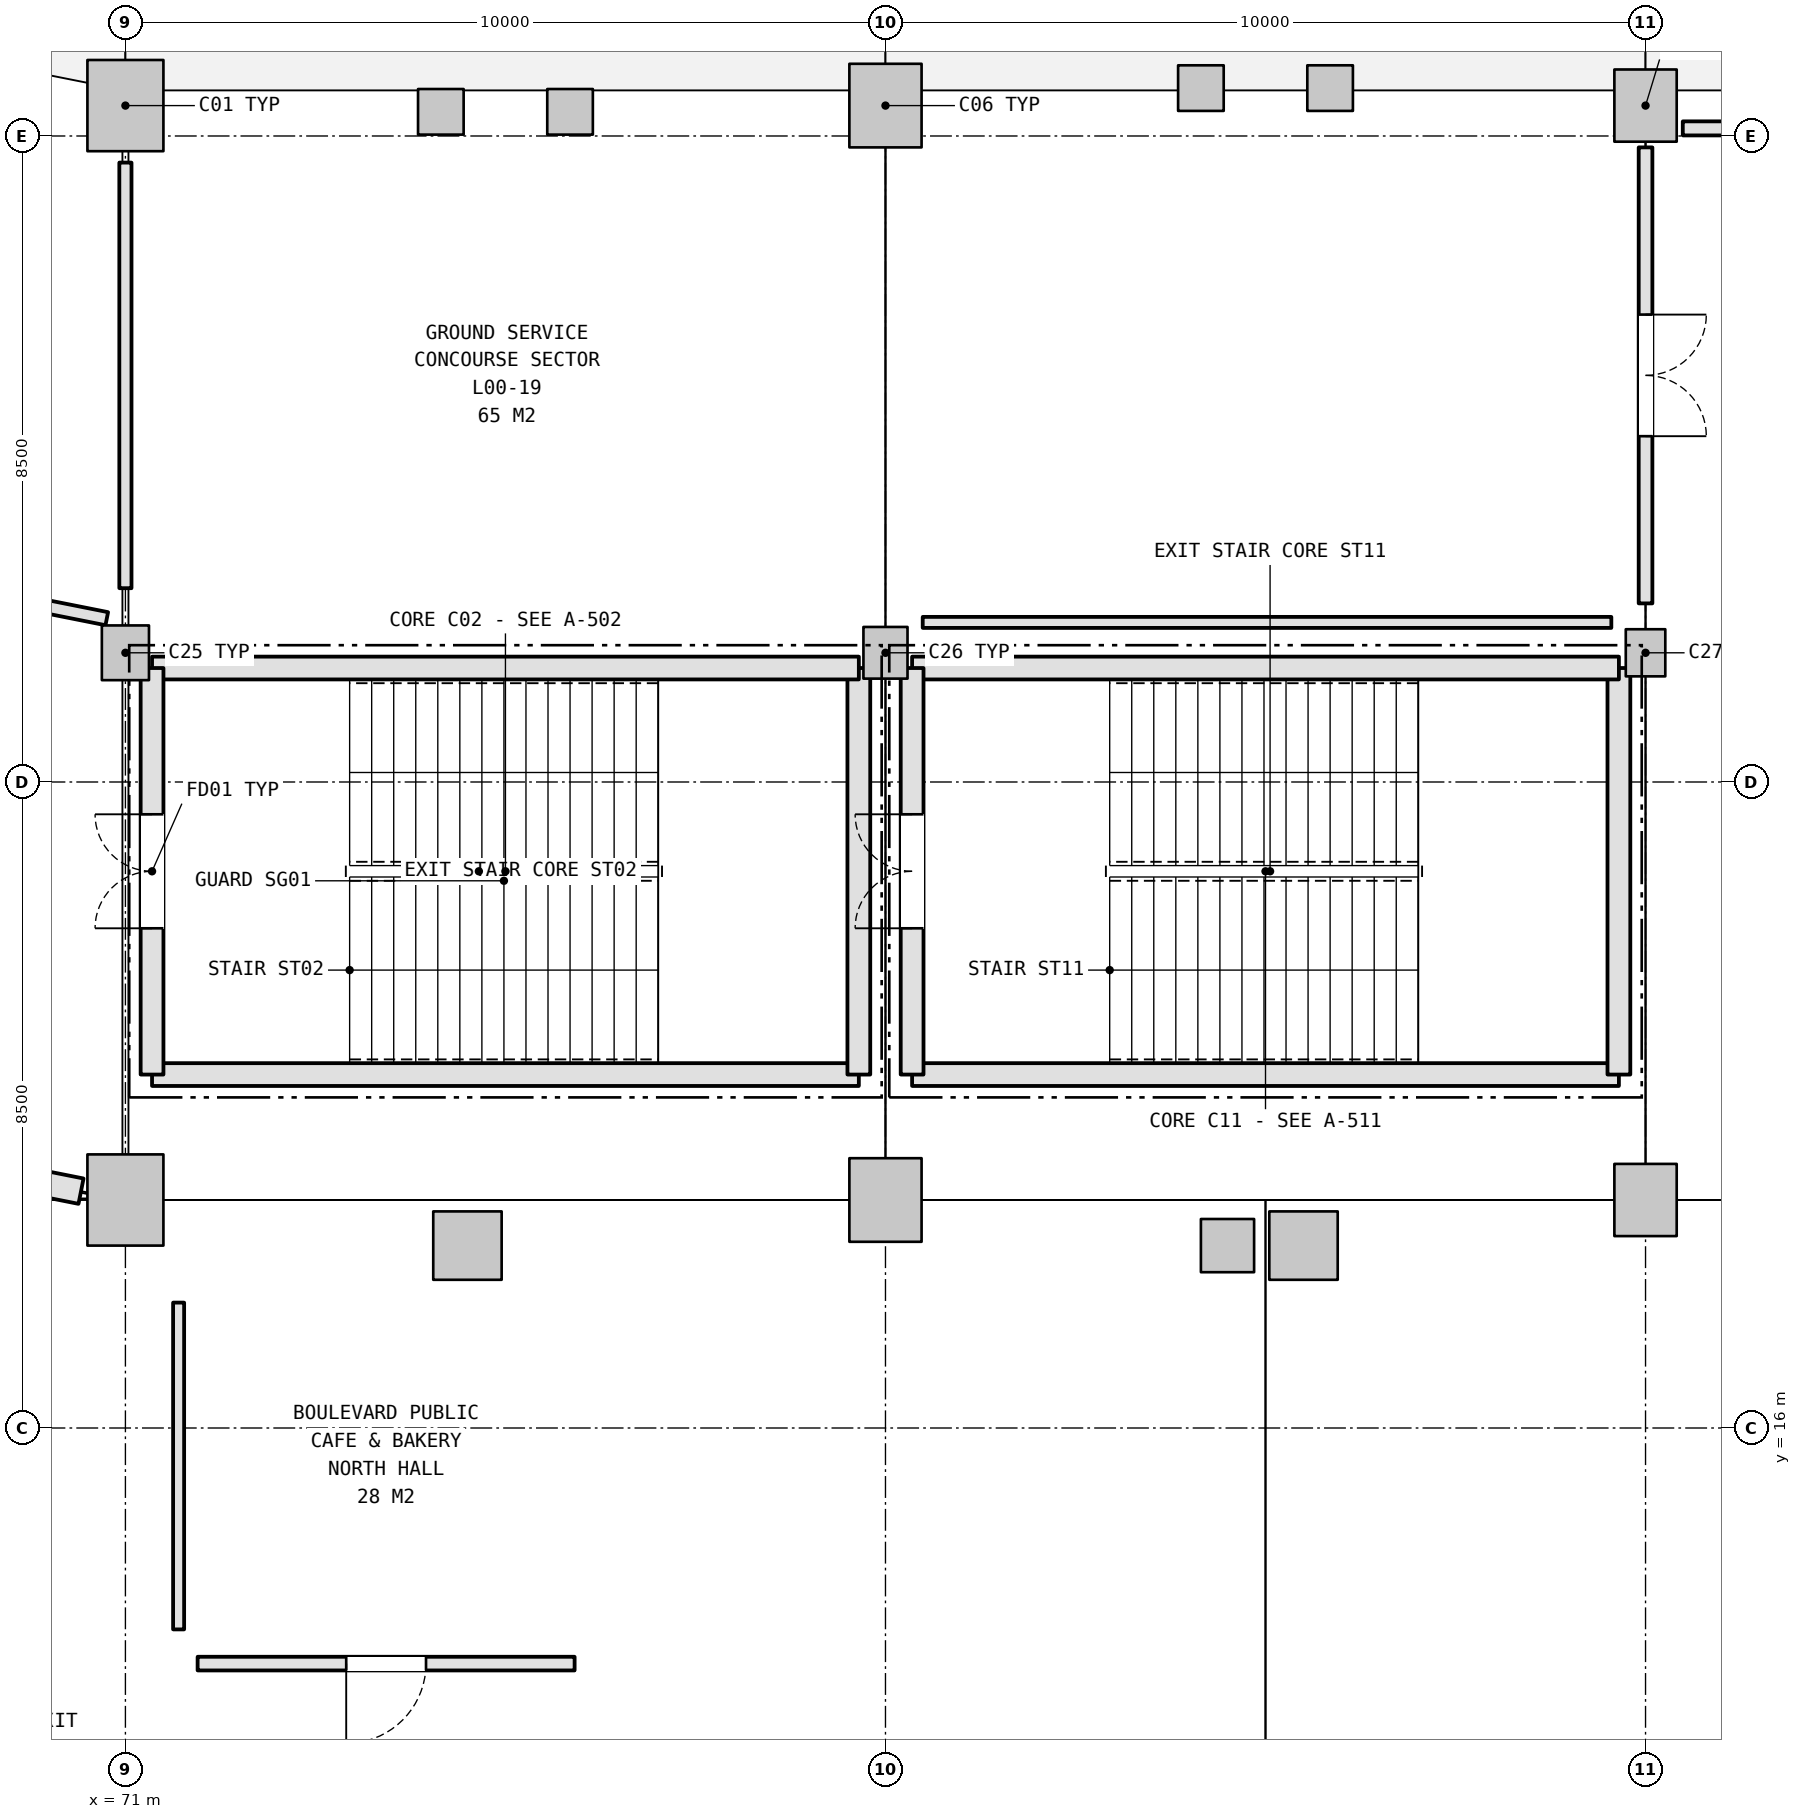
"""IFC4 building model, lengths in metres.
Left out: names, types, materials, properties, quantities, classifications, styles, units other than length and angle.
Written with IfcOpenShell. Run it as: python <this file> out.ifc"""

import sys

from ifc_helpers import new_model, si_unit, direction, frame, frame_2d, origin, origin_2d, place, context, subcontext, project, spatial, rectangle, extrude, element, fill, save


model = new_model("IFC4")
c1 = context("Model", 3, precision=1e-05, world=origin(), true_north=direction((0.0, 1.0)))
c2 = subcontext(c1, "Body", "Model", "MODEL_VIEW")
j1 = project(units=[si_unit("LENGTHUNIT", "METRE"), si_unit("PLANEANGLEUNIT", "RADIAN")], contexts=[c1])
p1 = place(None, origin())
s1 = spatial("IfcSite", under=j1, at=p1, CompositionType="ELEMENT")
p2 = place(p1, origin())
s2 = spatial("IfcBuilding", under=s1, at=p2, CompositionType="ELEMENT")
p3 = place(p2, origin())
s3 = spatial("IfcBuildingStorey", under=s2, at=p3, CompositionType="ELEMENT", Elevation=0.0)
p4 = place(p3, frame((71.0, 33.4, 0.0), z_axis=(0.0, 0.0, 1.0), x_axis=(1.0, 0.0, 0.0)))
e1 = element("IfcColumn", 1, at=p4, inside=s3, PredefinedType="COLUMN", context=c2, shape_type="SweptSolid", body=[
    extrude(rectangle(XDim=1.0, YDim=1.2, at=origin_2d()), origin(), (0.0, 0.0, 1.0), 5.4),
])
p5 = place(p3, frame((71.0, 26.2, 0.0), z_axis=(0.0, 0.0, 1.0), x_axis=(1.0, 0.0, 0.0)))
e2 = element("IfcColumn", 2, at=p5, inside=s3, PredefinedType="COLUMN", context=c2, shape_type="SweptSolid", body=[
    extrude(rectangle(XDim=0.62, YDim=0.72, at=origin_2d()), origin(), (0.0, 0.0, 1.0), 5.4),
])
p6 = place(p3, frame((71.0, 19.0, 0.0), z_axis=(0.0, 0.0, 1.0), x_axis=(1.0, 0.0, 0.0)))
e3 = element("IfcColumn", 3, at=p6, inside=s3, PredefinedType="COLUMN", context=c2, shape_type="SweptSolid", body=[
    extrude(rectangle(XDim=1.0, YDim=1.2, at=origin_2d()), origin(), (0.0, 0.0, 1.0), 5.4),
])
p7 = place(p3, frame((81.0, 33.4, 0.0), z_axis=(0.0, 0.0, 1.0), x_axis=(1.0, 0.0, 0.0)))
e4 = element("IfcColumn", 4, at=p7, inside=s3, PredefinedType="COLUMN", context=c2, shape_type="SweptSolid", body=[
    extrude(rectangle(XDim=0.95, YDim=1.1, at=origin_2d()), origin(), (0.0, 0.0, 1.0), 5.4),
])
p8 = place(p3, frame((81.0, 26.2, 0.0), z_axis=(0.0, 0.0, 1.0), x_axis=(1.0, 0.0, 0.0)))
e5 = element("IfcColumn", 5, at=p8, inside=s3, PredefinedType="COLUMN", context=c2, shape_type="SweptSolid", body=[
    extrude(rectangle(XDim=0.58, YDim=0.68, at=origin_2d()), origin(), (0.0, 0.0, 1.0), 5.4),
])
p9 = place(p3, frame((81.0, 19.0, 0.0), z_axis=(0.0, 0.0, 1.0), x_axis=(1.0, 0.0, 0.0)))
e6 = element("IfcColumn", 6, at=p9, inside=s3, PredefinedType="COLUMN", context=c2, shape_type="SweptSolid", body=[
    extrude(rectangle(XDim=0.95, YDim=1.1, at=origin_2d()), origin(), (0.0, 0.0, 1.0), 5.4),
])
p10 = place(p3, frame((91.0, 33.4, 0.0), z_axis=(0.0, 0.0, 1.0), x_axis=(1.0, 0.0, 0.0)))
e7 = element("IfcColumn", 7, at=p10, inside=s3, PredefinedType="COLUMN", context=c2, shape_type="SweptSolid", body=[
    extrude(rectangle(XDim=0.82, YDim=0.95, at=origin_2d()), origin(), (0.0, 0.0, 1.0), 5.4),
])
p11 = place(p3, frame((91.0, 26.2, 0.0), z_axis=(0.0, 0.0, 1.0), x_axis=(1.0, 0.0, 0.0)))
e8 = element("IfcColumn", 8, at=p11, inside=s3, PredefinedType="COLUMN", context=c2, shape_type="SweptSolid", body=[
    extrude(rectangle(XDim=0.52, YDim=0.62, at=origin_2d()), origin(), (0.0, 0.0, 1.0), 5.4),
])
p12 = place(p3, frame((91.0, 19.0, 0.0), z_axis=(0.0, 0.0, 1.0), x_axis=(1.0, 0.0, 0.0)))
e9 = element("IfcColumn", 9, at=p12, inside=s3, PredefinedType="COLUMN", context=c2, shape_type="SweptSolid", body=[
    extrude(rectangle(XDim=0.82, YDim=0.95, at=origin_2d()), origin(), (0.0, 0.0, 1.0), 5.4),
])
p13 = place(p3, frame((75.5, 18.4, 0.0), z_axis=(0.0, 0.0, 1.0), x_axis=(1.0, 0.0, 0.0)))
e10 = element("IfcColumn", 10, at=p13, inside=s3, PredefinedType="COLUMN", context=c2, shape_type="SweptSolid", body=[
    extrude(rectangle(XDim=0.9, YDim=0.9, at=origin_2d()), origin(), (0.0, 0.0, 1.0), 5.4),
])
p14 = place(p3, frame((85.5, 18.4, 0.0), z_axis=(0.0, 0.0, 1.0), x_axis=(1.0, 0.0, 0.0)))
e11 = element("IfcColumn", 11, at=p14, inside=s3, PredefinedType="COLUMN", context=c2, shape_type="SweptSolid", body=[
    extrude(rectangle(XDim=0.7, YDim=0.7, at=origin_2d()), origin(), (0.0, 0.0, 1.0), 5.4),
])
p15 = place(p3, frame((86.5, 18.4, 0.0), z_axis=(0.0, 0.0, 1.0), x_axis=(1.0, 0.0, 0.0)))
e12 = element("IfcColumn", 12, at=p15, inside=s3, PredefinedType="COLUMN", context=c2, shape_type="SweptSolid", body=[
    extrude(rectangle(XDim=0.9, YDim=0.9, at=origin_2d()), origin(), (0.0, 0.0, 1.0), 5.4),
])
p16 = place(p3, frame((51.489, 22.881, 0.0), z_axis=(0.0, 0.0, 1.0), x_axis=(0.98078547189, -0.195089359346, 0.0)))
e13 = element("IfcWall", 13, at=p16, inside=s3, PredefinedType="SOLIDWALL", context=c2, shape_type="SweptSolid", body=[
    extrude(rectangle(XDim=19.298, YDim=0.34, at=frame_2d((9.649, 0.0))), origin(), (0.0, 0.0, 1.0), 4.275),
])
p17 = place(p16, frame((8.849, 0.0, 2.4)))
e14 = element("IfcOpeningElement", 14, at=p17, cuts=e13, PredefinedType="OPENING", context=c2, shape_type="SweptSolid", body=[
    extrude(rectangle(XDim=1.6, YDim=1.2, at=frame_2d((0.8, 0.6))), frame((0.0, 0.18, 0.0), z_axis=(0.0, -1.0, 0.0), x_axis=(1.0, 0.0, 0.0)), (0.0, 0.0, 1.0), 0.36),
])
p18 = place(p3, frame((71.35, 20.65, 0.0), z_axis=(0.0, 0.0, 1.0), x_axis=(1.0, 0.0, 0.0)))
e15 = element("IfcWall", 15, at=p18, inside=s3, PredefinedType="SHEAR", context=c2, shape_type="SweptSolid", body=[
    extrude(rectangle(XDim=9.299, YDim=0.3, at=frame_2d((4.65, 0.0))), origin(), (0.0, 0.0, 1.0), 5.14),
])
p19 = place(p3, frame((80.65, 20.65, 0.0), z_axis=(0.0, 0.0, 1.0), x_axis=(0.0, 1.0, 0.0)))
e16 = element("IfcWall", 16, at=p19, inside=s3, PredefinedType="SHEAR", context=c2, shape_type="SweptSolid", body=[
    extrude(rectangle(XDim=5.349, YDim=0.3, at=frame_2d((2.675, 0.0))), origin(), (0.0, 0.0, 1.0), 5.14),
])
p20 = place(p3, frame((80.65, 26.0, 0.0), z_axis=(0.0, 0.0, 1.0), x_axis=(-1.0, 0.0, 0.0)))
e17 = element("IfcWall", 17, at=p20, inside=s3, PredefinedType="SHEAR", context=c2, shape_type="SweptSolid", body=[
    extrude(rectangle(XDim=9.299, YDim=0.3, at=frame_2d((4.65, 0.0))), origin(), (0.0, 0.0, 1.0), 5.14),
])
p21 = place(p3, frame((71.35, 26.0, 0.0), z_axis=(0.0, 0.0, 1.0), x_axis=(0.0, -1.0, 0.0)))
e18 = element("IfcWall", 18, at=p21, inside=s3, PredefinedType="SHEAR", context=c2, shape_type="SweptSolid", body=[
    extrude(rectangle(XDim=5.349, YDim=0.3, at=frame_2d((2.675, 0.0))), origin(), (0.0, 0.0, 1.0), 5.14),
])
p22 = place(p21, frame((1.925, 0.0, 0.0)))
e19 = element("IfcOpeningElement", 19, at=p22, cuts=e18, PredefinedType="OPENING", context=c2, shape_type="SweptSolid", body=[
    extrude(rectangle(XDim=1.5, YDim=2.2, at=frame_2d((0.75, 1.1))), frame((0.0, 0.16, 0.0), z_axis=(0.0, -1.0, 0.0), x_axis=(1.0, 0.0, 0.0)), (0.0, 0.0, 1.0), 0.32),
])
p23 = place(p3, frame((81.35, 20.65, 0.0), z_axis=(0.0, 0.0, 1.0), x_axis=(1.0, 0.0, 0.0)))
e20 = element("IfcWall", 20, at=p23, inside=s3, PredefinedType="SHEAR", context=c2, shape_type="SweptSolid", body=[
    extrude(rectangle(XDim=9.299, YDim=0.3, at=frame_2d((4.65, 0.0))), origin(), (0.0, 0.0, 1.0), 5.14),
])
p24 = place(p3, frame((90.65, 20.65, 0.0), z_axis=(0.0, 0.0, 1.0), x_axis=(0.0, 1.0, 0.0)))
e21 = element("IfcWall", 21, at=p24, inside=s3, PredefinedType="SHEAR", context=c2, shape_type="SweptSolid", body=[
    extrude(rectangle(XDim=5.349, YDim=0.3, at=frame_2d((2.675, 0.0))), origin(), (0.0, 0.0, 1.0), 5.14),
])
p25 = place(p3, frame((90.65, 26.0, 0.0), z_axis=(0.0, 0.0, 1.0), x_axis=(-1.0, 0.0, 0.0)))
e22 = element("IfcWall", 22, at=p25, inside=s3, PredefinedType="SHEAR", context=c2, shape_type="SweptSolid", body=[
    extrude(rectangle(XDim=9.299, YDim=0.3, at=frame_2d((4.65, 0.0))), origin(), (0.0, 0.0, 1.0), 5.14),
])
p26 = place(p3, frame((81.35, 26.0, 0.0), z_axis=(0.0, 0.0, 1.0), x_axis=(0.0, -1.0, 0.0)))
e23 = element("IfcWall", 23, at=p26, inside=s3, PredefinedType="SHEAR", context=c2, shape_type="SweptSolid", body=[
    extrude(rectangle(XDim=5.349, YDim=0.3, at=frame_2d((2.675, 0.0))), origin(), (0.0, 0.0, 1.0), 5.14),
])
p27 = place(p26, frame((1.925, 0.0, 0.0)))
e24 = element("IfcOpeningElement", 24, at=p27, cuts=e23, PredefinedType="OPENING", context=c2, shape_type="SweptSolid", body=[
    extrude(rectangle(XDim=1.5, YDim=2.2, at=frame_2d((0.75, 1.1))), frame((0.0, 0.16, 0.0), z_axis=(0.0, -1.0, 0.0), x_axis=(1.0, 0.0, 0.0)), (0.0, 0.0, 1.0), 0.32),
])
for number, where, z_axis, x_axis in (
    (25, (86.85, 33.63, 0.0), (0.0, 0.0, 1.0), (1.0, 0.0, 0.0)),
    (26, (85.15, 33.63, 0.0), (0.0, 0.0, 1.0), (1.0, 0.0, 0.0)),
    (27, (76.85, 33.318, 0.0), (0.0, 0.0, 1.0), (1.0, 0.0, 0.0)),
    (28, (75.15, 33.318, 0.0), (0.0, 0.0, 1.0), (1.0, 0.0, 0.0)),
):
    element("IfcColumn", number, at=place(p3, frame(where, z_axis=z_axis, x_axis=x_axis)), inside=s3, PredefinedType="COLUMN", context=c2, shape_type="SweptSolid", body=[
        extrude(rectangle(XDim=0.6, YDim=0.6, at=origin_2d()), origin(), (0.0, 0.0, 1.0), 5.4),
    ])
p28 = place(p3, frame((76.91, 12.9, 0.0), z_axis=(0.0, 0.0, 1.0), x_axis=(-1.0, 0.0, 0.0)))
e29 = element("IfcWall", 29, at=p28, inside=s3, PredefinedType="PARTITIONING", context=c2, shape_type="SweptSolid", body=[
    extrude(rectangle(XDim=4.96, YDim=0.18, at=frame_2d((2.48, 0.0))), origin(), (0.0, 0.0, 1.0), 4.425),
])
p29 = place(p28, frame((1.955, 0.0, 0.0)))
e30 = element("IfcOpeningElement", 30, at=p29, cuts=e29, PredefinedType="OPENING", context=c2, shape_type="SweptSolid", body=[
    extrude(rectangle(XDim=1.05, YDim=2.2, at=frame_2d((0.525, 1.1))), frame((0.0, 0.1, 0.0), z_axis=(0.0, -1.0, 0.0), x_axis=(1.0, 0.0, 0.0)), (0.0, 0.0, 1.0), 0.2),
])
p30 = place(p3, frame((71.7, 13.35, 0.0), z_axis=(0.0, 0.0, 1.0), x_axis=(0.0, 1.0, 0.0)))
e31 = element("IfcWall", 31, at=p30, inside=s3, PredefinedType="PARTITIONING", context=c2, shape_type="SweptSolid", body=[
    extrude(rectangle(XDim=4.3, YDim=0.145, at=frame_2d((2.15, 0.0))), origin(), (0.0, 0.0, 1.0), 4.625),
])
p31 = place(p3, frame((70.755, 26.649, 0.0), z_axis=(0.0, 0.0, 1.0), x_axis=(-0.980783244425, 0.195100557291, 0.0)))
e32 = element("IfcWall", 32, at=p31, inside=s3, PredefinedType="PARTITIONING", context=c2, shape_type="SweptSolid", body=[
    extrude(rectangle(XDim=16.783, YDim=0.175, at=frame_2d((8.392, 0.0))), origin(), (0.0, 0.0, 1.0), 4.375),
])
p32 = place(p31, frame((7.932, 0.0, 0.0)))
e33 = element("IfcOpeningElement", 33, at=p32, cuts=e32, PredefinedType="OPENING", context=c2, shape_type="SweptSolid", body=[
    extrude(rectangle(XDim=0.92, YDim=2.1, at=frame_2d((0.46, 1.05))), frame((0.0, 0.097, 0.0), z_axis=(0.0, -1.0, 0.0), x_axis=(1.0, 0.0, 0.0)), (0.0, 0.0, 1.0), 0.195),
])
p33 = place(p3, frame((71.0, 32.65, 0.0), z_axis=(0.0, 0.0, 1.0), x_axis=(0.0, -1.0, 0.0)))
e34 = element("IfcWall", 34, at=p33, inside=s3, PredefinedType="PARTITIONING", context=c2, shape_type="SweptSolid", body=[
    extrude(rectangle(XDim=5.6, YDim=0.16, at=frame_2d((2.8, 0.0))), origin(), (0.0, 0.0, 1.0), 4.365),
])
p34 = place(p3, frame((91.0, 32.85, 0.0), z_axis=(0.0, 0.0, 1.0), x_axis=(0.0, -1.0, 0.0)))
e35 = element("IfcWall", 35, at=p34, inside=s3, PredefinedType="PARTITIONING", context=c2, shape_type="SweptSolid", body=[
    extrude(rectangle(XDim=6.0, YDim=0.18, at=frame_2d((3.0, 0.0))), origin(), (0.0, 0.0, 1.0), 4.305),
])
p35 = place(p34, frame((2.2, 0.0, 0.0)))
e36 = element("IfcOpeningElement", 36, at=p35, cuts=e35, PredefinedType="OPENING", context=c2, shape_type="SweptSolid", body=[
    extrude(rectangle(XDim=1.6, YDim=2.2, at=frame_2d((0.8, 1.1))), frame((0.0, 0.1, 0.0), z_axis=(0.0, -1.0, 0.0), x_axis=(1.0, 0.0, 0.0)), (0.0, 0.0, 1.0), 0.2),
])
p36 = place(p3, frame((90.55, 26.6, 0.0), z_axis=(0.0, 0.0, 1.0), x_axis=(-1.0, 0.0, 0.0)))
e37 = element("IfcWall", 37, at=p36, inside=s3, PredefinedType="PARTITIONING", context=c2, shape_type="SweptSolid", body=[
    extrude(rectangle(XDim=9.06, YDim=0.145, at=frame_2d((4.53, 0.0))), origin(), (0.0, 0.0, 1.0), 5.12),
])
p37 = place(p3, frame((91.49, 33.1, 0.0), z_axis=(0.0, 0.0, 1.0), x_axis=(1.0, 0.0, 0.0)))
e38 = element("IfcWall", 38, at=p37, inside=s3, PredefinedType="PARTITIONING", context=c2, shape_type="SweptSolid", body=[
    extrude(rectangle(XDim=9.06, YDim=0.185, at=frame_2d((4.53, 0.0))), origin(), (0.0, 0.0, 1.0), 4.325),
])
p38 = place(p22, frame((1.5, 0.0, 0.0), z_axis=(0.0, 0.0, 1.0), x_axis=(-1.0, 0.0, 0.0)))
e39 = element("IfcDoor", 39, at=p38, inside=s3, OperationType="DOUBLE_DOOR_SINGLE_SWING", PredefinedType="DOOR", context=c2, shape_type="SweptSolid", body=[
    extrude(rectangle(XDim=1.5, YDim=2.2, at=frame_2d((0.75, 1.1))), frame((0.0, 0.025, 0.0), z_axis=(0.0, -1.0, 0.0), x_axis=(1.0, 0.0, 0.0)), (0.0, 0.0, 1.0), 0.05),
])
fill(e19, e39)
p39 = place(p27, frame((1.5, 0.0, 0.0), z_axis=(0.0, 0.0, 1.0), x_axis=(-1.0, 0.0, 0.0)))
e40 = element("IfcDoor", 40, at=p39, inside=s3, OperationType="DOUBLE_DOOR_SINGLE_SWING", PredefinedType="DOOR", context=c2, shape_type="SweptSolid", body=[
    extrude(rectangle(XDim=1.5, YDim=2.2, at=frame_2d((0.75, 1.1))), frame((0.0, 0.025, 0.0), z_axis=(0.0, -1.0, 0.0), x_axis=(1.0, 0.0, 0.0)), (0.0, 0.0, 1.0), 0.05),
])
fill(e24, e40)
p40 = place(p29, origin())
e41 = element("IfcDoor", 41, at=p40, inside=s3, OperationType="SINGLE_SWING_RIGHT", PredefinedType="DOOR", context=c2, shape_type="SweptSolid", body=[
    extrude(rectangle(XDim=1.05, YDim=2.2, at=frame_2d((0.525, 1.1))), frame((0.0, 0.025, 0.0), z_axis=(0.0, -1.0, 0.0), x_axis=(1.0, 0.0, 0.0)), (0.0, 0.0, 1.0), 0.05),
])
fill(e30, e41)
p41 = place(p35, origin())
e42 = element("IfcDoor", 42, at=p41, inside=s3, OperationType="DOUBLE_DOOR_SINGLE_SWING", PredefinedType="DOOR", context=c2, shape_type="SweptSolid", body=[
    extrude(rectangle(XDim=1.6, YDim=2.2, at=frame_2d((0.8, 1.1))), frame((0.0, 0.025, 0.0), z_axis=(0.0, -1.0, 0.0), x_axis=(1.0, 0.0, 0.0)), (0.0, 0.0, 1.0), 0.05),
])
fill(e36, e42)
save(model, sys.argv[1])
